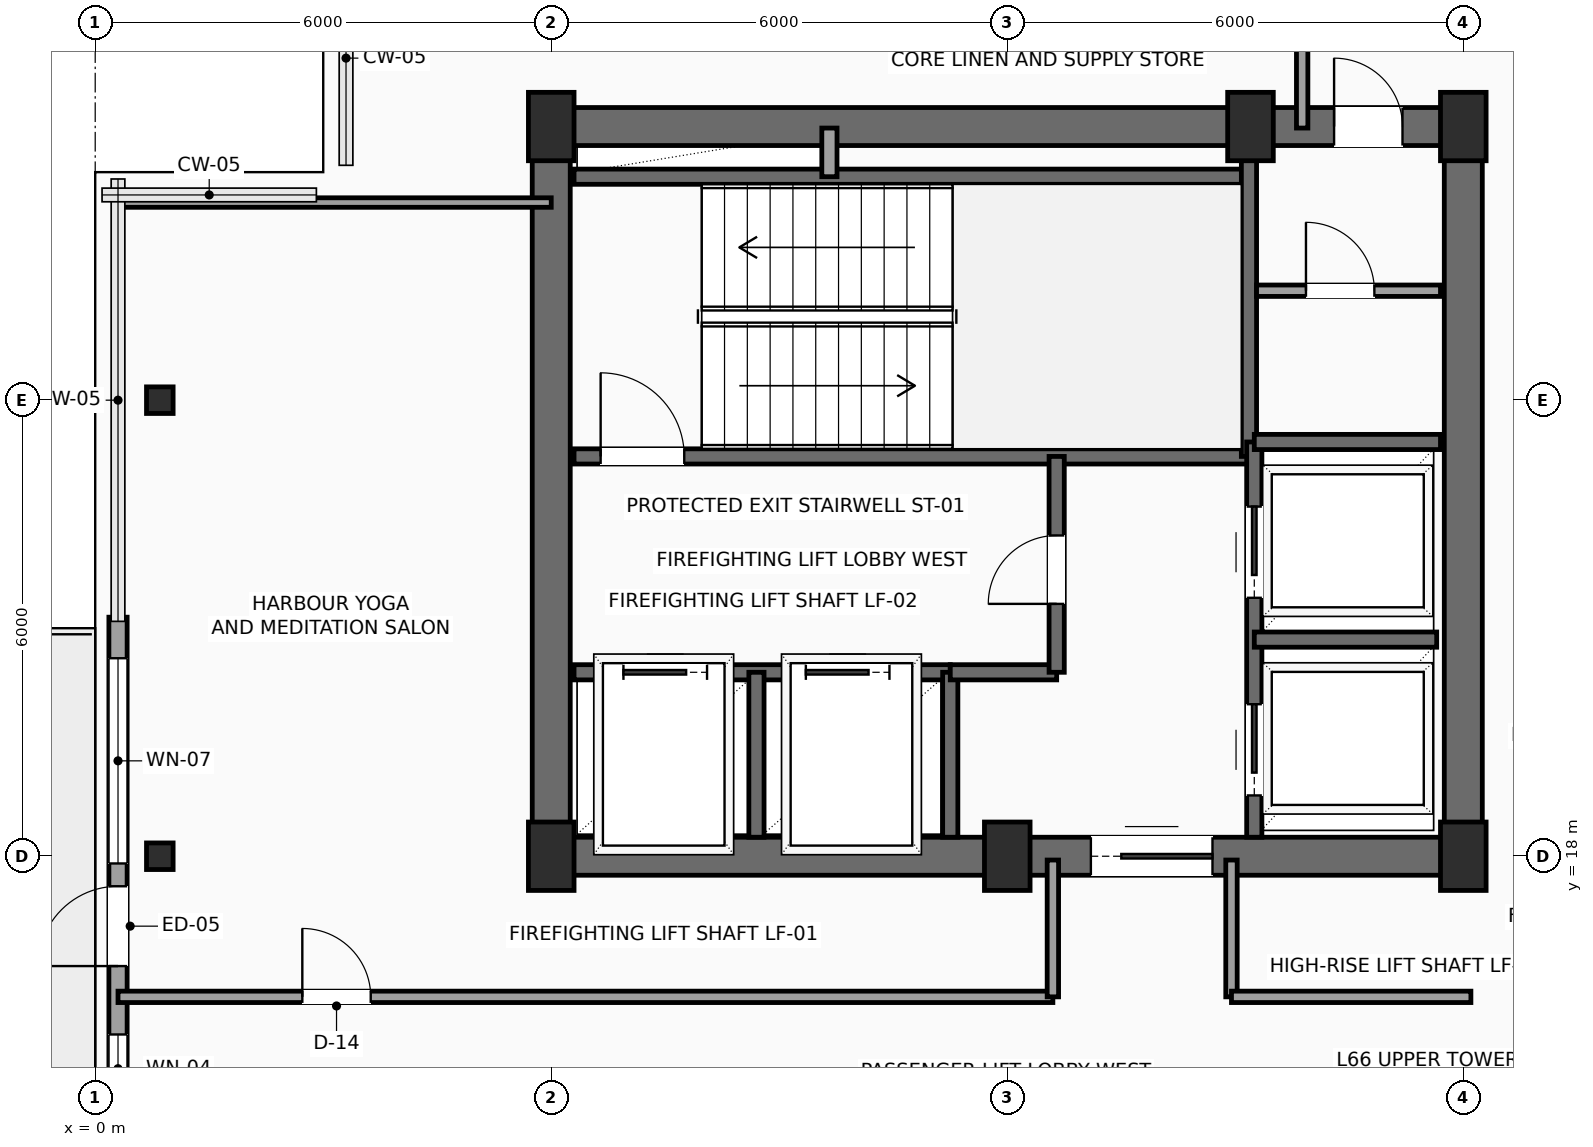
"""IFC4 building model, lengths in metres.
Left out: names, types, materials, properties, quantities, classifications, styles, units other than length and angle.
Written with IfcOpenShell. Run it as: python <this file> out.ifc"""

import sys

from ifc_helpers import new_model, si_unit, direction, frame, frame_2d, origin, origin_2d, place, context, subcontext, project, spatial, rectangle, hollow_rectangle, extrude, element, fill, save


model = new_model("IFC4")
c1 = context("Model", 3, precision=1e-05, world=origin(), true_north=direction((0.0, 1.0)))
c2 = subcontext(c1, "Body", "Model", "MODEL_VIEW")
j1 = project(units=[si_unit("LENGTHUNIT", "METRE"), si_unit("PLANEANGLEUNIT", "RADIAN")], contexts=[c1])
p1 = place(None, origin())
s1 = spatial("IfcSite", under=j1, at=p1, CompositionType="ELEMENT")
p2 = place(p1, origin())
s2 = spatial("IfcBuilding", under=s1, at=p2, CompositionType="ELEMENT")
p3 = place(p2, frame((0.0, 0.0, 264.2)))
s3 = spatial("IfcBuildingStorey", under=s2, at=p3, CompositionType="ELEMENT", Elevation=264.2)
for number, where, z_axis, x_axis in (
    (1, (6.0, 18.0, 0.0), (0.0, 0.0, 1.0), (1.0, 0.0, 0.0)),
    (2, (12.0, 18.0, 0.0), (0.0, 0.0, 1.0), (1.0, 0.0, 0.0)),
    (3, (18.0, 18.0, 0.0), (0.0, 0.0, 1.0), (1.0, 0.0, 0.0)),
    (4, (6.0, 27.6, 0.0), (0.0, 0.0, 1.0), (1.0, 0.0, 0.0)),
    (5, (15.2, 27.6, 0.0), (0.0, 0.0, 1.0), (1.0, 0.0, 0.0)),
    (6, (18.0, 27.6, 0.0), (0.0, 0.0, 1.0), (1.0, 0.0, 0.0)),
):
    element("IfcColumn", number, at=place(p3, frame(where, z_axis=z_axis, x_axis=x_axis)), inside=s3, PredefinedType="COLUMN", context=c2, shape_type="SweptSolid", body=[
        extrude(rectangle(XDim=0.6, YDim=0.9, at=origin_2d()), origin(), (0.0, 0.0, 1.0), 3.5),
    ])
for number, where, z_axis, x_axis in (
    (7, (0.85, 18.0, 0.0), (0.0, 0.0, 1.0), (1.0, 0.0, 0.0)),
    (8, (0.85, 24.0, 0.0), (0.0, 0.0, 1.0), (1.0, 0.0, 0.0)),
):
    element("IfcColumn", number, at=place(p3, frame(where, z_axis=z_axis, x_axis=x_axis)), inside=s3, PredefinedType="COLUMN", context=c2, shape_type="SweptSolid", body=[
        extrude(hollow_rectangle(XDim=0.35, YDim=0.35, WallThickness=0.016, InnerFilletRadius=0.016, OuterFilletRadius=0.032, at=origin_2d()), origin(), (0.0, 0.0, 1.0), 3.5),
    ])
p4 = place(p3, frame((0.3, 11.855, 0.0), z_axis=(0.0, 0.0, 1.0), x_axis=(0.0, 1.0, 0.0)))
e9 = element("IfcWall", 9, at=p4, inside=s3, PredefinedType="SOLIDWALL", context=c2, shape_type="SweptSolid", body=[
    extrude(rectangle(XDim=9.29, YDim=0.24, at=frame_2d((4.645, 0.0))), origin(), (0.0, 0.0, 1.0), 3.3),
])
p5 = place(p4, frame((4.7, 0.0, 0.0)))
e10 = element("IfcOpeningElement", 10, at=p5, cuts=e9, PredefinedType="OPENING", context=c2, shape_type="SweptSolid", body=[
    extrude(rectangle(XDim=1.05, YDim=2.2, at=frame_2d((0.525, 1.1))), frame((0.0, 0.13, 0.0), z_axis=(0.0, -1.0, 0.0), x_axis=(1.0, 0.0, 0.0)), (0.0, 0.0, 1.0), 0.26),
])
p6 = place(p4, frame((6.05, 0.0, 0.6)))
e11 = element("IfcOpeningElement", 11, at=p6, cuts=e9, PredefinedType="OPENING", context=c2, shape_type="SweptSolid", body=[
    extrude(rectangle(XDim=2.7, YDim=2.3, at=frame_2d((1.35, 1.15))), frame((0.0, 0.13, 0.0), z_axis=(0.0, -1.0, 0.0), x_axis=(1.0, 0.0, 0.0)), (0.0, 0.0, 1.0), 0.26),
])
p7 = place(p4, frame((2.9, 0.0, 0.6)))
e12 = element("IfcOpeningElement", 12, at=p7, cuts=e9, PredefinedType="OPENING", context=c2, shape_type="SweptSolid", body=[
    extrude(rectangle(XDim=0.9, YDim=2.2, at=frame_2d((0.45, 1.1))), frame((0.0, 0.13, 0.0), z_axis=(0.0, -1.0, 0.0), x_axis=(1.0, 0.0, 0.0)), (0.0, 0.0, 1.0), 0.26),
])
p8 = place(p3, frame((6.0, 18.0, 0.0), z_axis=(0.0, 0.0, 1.0), x_axis=(1.0, 0.0, 0.0)))
e13 = element("IfcWall", 13, at=p8, inside=s3, PredefinedType="SHEAR", context=c2, shape_type="SweptSolid", body=[
    extrude(rectangle(XDim=12.0, YDim=0.5, at=frame_2d((6.0, 0.0))), origin(), (0.0, 0.0, 1.0), 3.3),
])
p9 = place(p8, frame((7.1, 0.0, 0.0)))
e14 = element("IfcOpeningElement", 14, at=p9, cuts=e13, PredefinedType="OPENING", context=c2, shape_type="SweptSolid", body=[
    extrude(rectangle(XDim=1.6, YDim=2.3, at=frame_2d((0.8, 1.15))), frame((0.0, 0.26, 0.0), z_axis=(0.0, -1.0, 0.0), x_axis=(1.0, 0.0, 0.0)), (0.0, 0.0, 1.0), 0.52),
])
p10 = place(p3, frame((6.0, 27.6, 0.0), z_axis=(0.0, 0.0, 1.0), x_axis=(1.0, 0.0, 0.0)))
e15 = element("IfcWall", 15, at=p10, inside=s3, PredefinedType="SHEAR", context=c2, shape_type="SweptSolid", body=[
    extrude(rectangle(XDim=12.0, YDim=0.5, at=frame_2d((6.0, 0.0))), origin(), (0.0, 0.0, 1.0), 3.3),
])
p11 = place(p10, frame((10.3, 0.0, 0.0)))
e16 = element("IfcOpeningElement", 16, at=p11, cuts=e15, PredefinedType="OPENING", context=c2, shape_type="SweptSolid", body=[
    extrude(rectangle(XDim=0.9, YDim=2.15, at=frame_2d((0.45, 1.075))), frame((0.0, 0.26, 0.0), z_axis=(0.0, -1.0, 0.0), x_axis=(1.0, 0.0, 0.0)), (0.0, 0.0, 1.0), 0.52),
])
for number, where, z_axis, x_axis in (
    (17, (6.0, 18.0, 0.0), (0.0, 0.0, 1.0), (0.0, 1.0, 0.0)),
    (18, (18.0, 18.0, 0.0), (0.0, 0.0, 1.0), (0.0, 1.0, 0.0)),
):
    element("IfcWall", number, at=place(p3, frame(where, z_axis=z_axis, x_axis=x_axis)), inside=s3, PredefinedType="SHEAR", context=c2, shape_type="SweptSolid", body=[
        extrude(rectangle(XDim=9.6, YDim=0.5, at=frame_2d((4.8, 0.0))), origin(), (0.0, 0.0, 1.0), 3.3),
    ])
p12 = place(p3, frame((6.3, 23.26, 0.0), z_axis=(0.0, 0.0, 1.0), x_axis=(1.0, 0.0, 0.0)))
e19 = element("IfcWall", 19, at=p12, inside=s3, PredefinedType="SHEAR", context=c2, shape_type="SweptSolid", body=[
    extrude(rectangle(XDim=8.88, YDim=0.2, at=frame_2d((4.44, 0.0))), origin(), (0.0, 0.0, 1.0), 3.3),
])
p13 = place(p12, frame((0.35, 0.0, 0.0)))
e20 = element("IfcOpeningElement", 20, at=p13, cuts=e19, PredefinedType="OPENING", context=c2, shape_type="SweptSolid", body=[
    extrude(rectangle(XDim=1.1, YDim=2.2, at=frame_2d((0.55, 1.1))), frame((0.0, 0.11, 0.0), z_axis=(0.0, -1.0, 0.0), x_axis=(1.0, 0.0, 0.0)), (0.0, 0.0, 1.0), 0.22),
])
p14 = place(p3, frame((6.3, 26.94, 0.0), z_axis=(0.0, 0.0, 1.0), x_axis=(1.0, 0.0, 0.0)))
e21 = element("IfcWall", 21, at=p14, inside=s3, PredefinedType="SHEAR", context=c2, shape_type="SweptSolid", body=[
    extrude(rectangle(XDim=8.88, YDim=0.2, at=frame_2d((4.44, 0.0))), origin(), (0.0, 0.0, 1.0), 3.3),
])
p15 = place(p3, frame((15.18, 23.26, 0.0), z_axis=(0.0, 0.0, 1.0), x_axis=(0.0, 1.0, 0.0)))
e22 = element("IfcWall", 22, at=p15, inside=s3, PredefinedType="SHEAR", context=c2, shape_type="SweptSolid", body=[
    extrude(rectangle(XDim=4.04, YDim=0.2, at=frame_2d((2.02, 0.0))), origin(), (0.0, 0.0, 1.0), 3.3),
])
p16 = place(p3, frame((6.3, 20.42, 0.0), z_axis=(0.0, 0.0, 1.0), x_axis=(1.0, 0.0, 0.0)))
e23 = element("IfcWall", 23, at=p16, inside=s3, PredefinedType="SHEAR", context=c2, shape_type="SweptSolid", body=[
    extrude(rectangle(XDim=4.95, YDim=0.2, at=frame_2d((2.475, 0.0))), origin(), (0.0, 0.0, 1.0), 3.3),
])
p17 = place(p16, frame((0.65, 0.0, 0.0)))
e24 = element("IfcOpeningElement", 24, at=p17, cuts=e23, PredefinedType="OPENING", context=c2, shape_type="SweptSolid", body=[
    extrude(rectangle(XDim=1.1, YDim=2.2, at=frame_2d((0.55, 1.1))), frame((0.0, 0.11, 0.0), z_axis=(0.0, -1.0, 0.0), x_axis=(1.0, 0.0, 0.0)), (0.0, 0.0, 1.0), 0.22),
])
p18 = place(p16, frame((3.05, 0.0, 0.0)))
e25 = element("IfcOpeningElement", 25, at=p18, cuts=e23, PredefinedType="OPENING", context=c2, shape_type="SweptSolid", body=[
    extrude(rectangle(XDim=1.1, YDim=2.2, at=frame_2d((0.55, 1.1))), frame((0.0, 0.11, 0.0), z_axis=(0.0, -1.0, 0.0), x_axis=(1.0, 0.0, 0.0)), (0.0, 0.0, 1.0), 0.22),
])
for number, where, z_axis, x_axis in (
    (26, (8.7, 18.25, 0.0), (0.0, 0.0, 1.0), (0.0, 1.0, 0.0)),
    (27, (11.25, 18.25, 0.0), (0.0, 0.0, 1.0), (0.0, 1.0, 0.0)),
):
    element("IfcWall", number, at=place(p3, frame(where, z_axis=z_axis, x_axis=x_axis)), inside=s3, PredefinedType="SHEAR", context=c2, shape_type="SweptSolid", body=[
        extrude(rectangle(XDim=2.17, YDim=0.2, at=frame_2d((1.085, 0.0))), origin(), (0.0, 0.0, 1.0), 3.3),
    ])
p19 = place(p3, frame((11.25, 20.42, 0.0), z_axis=(0.0, 0.0, 1.0), x_axis=(1.0, 0.0, 0.0)))
e28 = element("IfcWall", 28, at=p19, inside=s3, PredefinedType="SHEAR", context=c2, shape_type="SweptSolid", body=[
    extrude(rectangle(XDim=1.4, YDim=0.2, at=frame_2d((0.7, 0.0))), origin(), (0.0, 0.0, 1.0), 3.3),
])
p20 = place(p3, frame((12.65, 20.42, 0.0), z_axis=(0.0, 0.0, 1.0), x_axis=(0.0, 1.0, 0.0)))
e29 = element("IfcWall", 29, at=p20, inside=s3, PredefinedType="SHEAR", context=c2, shape_type="SweptSolid", body=[
    extrude(rectangle(XDim=2.84, YDim=0.2, at=frame_2d((1.42, 0.0))), origin(), (0.0, 0.0, 1.0), 3.3),
])
p21 = place(p20, frame((0.9, 0.0, 0.0)))
e30 = element("IfcOpeningElement", 30, at=p21, cuts=e29, PredefinedType="OPENING", context=c2, shape_type="SweptSolid", body=[
    extrude(rectangle(XDim=0.9, YDim=2.15, at=frame_2d((0.45, 1.075))), frame((0.0, 0.11, 0.0), z_axis=(0.0, -1.0, 0.0), x_axis=(1.0, 0.0, 0.0)), (0.0, 0.0, 1.0), 0.22),
])
p22 = place(p3, frame((9.66, 26.94, 0.0), z_axis=(0.0, 0.0, 1.0), x_axis=(0.0, 1.0, 0.0)))
e31 = element("IfcWall", 31, at=p22, inside=s3, PredefinedType="SOLIDWALL", context=c2, shape_type="SweptSolid", body=[
    extrude(rectangle(XDim=0.64, YDim=0.2, at=frame_2d((0.32, 0.0))), origin(), (0.0, 0.0, 1.0), 3.3),
])
p23 = place(p3, frame((15.25, 18.25, 0.0), z_axis=(0.0, 0.0, 1.0), x_axis=(0.0, 1.0, 0.0)))
e32 = element("IfcWall", 32, at=p23, inside=s3, PredefinedType="SHEAR", context=c2, shape_type="SweptSolid", body=[
    extrude(rectangle(XDim=5.2, YDim=0.2, at=frame_2d((2.6, 0.0))), origin(), (0.0, 0.0, 1.0), 3.3),
])
p24 = place(p23, frame((0.55, 0.0, 0.0)))
e33 = element("IfcOpeningElement", 33, at=p24, cuts=e32, PredefinedType="OPENING", context=c2, shape_type="SweptSolid", body=[
    extrude(rectangle(XDim=1.2, YDim=2.2, at=frame_2d((0.6, 1.1))), frame((0.0, 0.11, 0.0), z_axis=(0.0, -1.0, 0.0), x_axis=(1.0, 0.0, 0.0)), (0.0, 0.0, 1.0), 0.22),
])
p25 = place(p23, frame((3.15, 0.0, 0.0)))
e34 = element("IfcOpeningElement", 34, at=p25, cuts=e32, PredefinedType="OPENING", context=c2, shape_type="SweptSolid", body=[
    extrude(rectangle(XDim=1.2, YDim=2.2, at=frame_2d((0.6, 1.1))), frame((0.0, 0.11, 0.0), z_axis=(0.0, -1.0, 0.0), x_axis=(1.0, 0.0, 0.0)), (0.0, 0.0, 1.0), 0.22),
])
p26 = place(p3, frame((15.25, 20.85, 0.0), z_axis=(0.0, 0.0, 1.0), x_axis=(1.0, 0.0, 0.0)))
e35 = element("IfcWall", 35, at=p26, inside=s3, PredefinedType="SHEAR", context=c2, shape_type="SweptSolid", body=[
    extrude(rectangle(XDim=2.4, YDim=0.2, at=frame_2d((1.2, 0.0))), origin(), (0.0, 0.0, 1.0), 3.3),
])
p27 = place(p3, frame((15.25, 23.45, 0.0), z_axis=(0.0, 0.0, 1.0), x_axis=(1.0, 0.0, 0.0)))
e36 = element("IfcWall", 36, at=p27, inside=s3, PredefinedType="SHEAR", context=c2, shape_type="SweptSolid", body=[
    extrude(rectangle(XDim=2.45, YDim=0.2, at=frame_2d((1.225, 0.0))), origin(), (0.0, 0.0, 1.0), 3.3),
])
p28 = place(p3, frame((15.28, 25.44, 0.0), z_axis=(0.0, 0.0, 1.0), x_axis=(1.0, 0.0, 0.0)))
e37 = element("IfcWall", 37, at=p28, inside=s3, PredefinedType="PARTITIONING", context=c2, shape_type="SweptSolid", body=[
    extrude(rectangle(XDim=2.42, YDim=0.15, at=frame_2d((1.21, 0.0))), origin(), (0.0, 0.0, 1.0), 3.3),
])
p29 = place(p28, frame((0.65, 0.0, 0.0)))
e38 = element("IfcOpeningElement", 38, at=p29, cuts=e37, PredefinedType="OPENING", context=c2, shape_type="SweptSolid", body=[
    extrude(rectangle(XDim=0.9, YDim=2.15, at=frame_2d((0.45, 1.075))), frame((0.0, 0.085, 0.0), z_axis=(0.0, -1.0, 0.0), x_axis=(1.0, 0.0, 0.0)), (0.0, 0.0, 1.0), 0.17),
])
p30 = place(p3, frame((0.3, 16.15, 0.0), z_axis=(0.0, 0.0, 1.0), x_axis=(1.0, 0.0, 0.0)))
e39 = element("IfcWall", 39, at=p30, inside=s3, PredefinedType="PARTITIONING", context=c2, shape_type="SweptSolid", body=[
    extrude(rectangle(XDim=12.3, YDim=0.15, at=frame_2d((6.15, 0.0))), origin(), (0.0, 0.0, 1.0), 3.3),
])
p31 = place(p30, frame((2.425, 0.0, 0.0)))
e40 = element("IfcOpeningElement", 40, at=p31, cuts=e39, PredefinedType="OPENING", context=c2, shape_type="SweptSolid", body=[
    extrude(rectangle(XDim=0.9, YDim=2.1, at=frame_2d((0.45, 1.05))), frame((0.0, 0.085, 0.0), z_axis=(0.0, -1.0, 0.0), x_axis=(1.0, 0.0, 0.0)), (0.0, 0.0, 1.0), 0.17),
])
for number, where, z_axis, x_axis in (
    (41, (12.6, 16.15, 0.0), (0.0, 0.0, 1.0), (0.0, 1.0, 0.0)),
    (42, (14.95, 17.95, 0.0), (0.0, 0.0, 1.0), (0.0, -1.0, 0.0)),
):
    element("IfcWall", number, at=place(p3, frame(where, z_axis=z_axis, x_axis=x_axis)), inside=s3, PredefinedType="PARTITIONING", context=c2, shape_type="SweptSolid", body=[
        extrude(rectangle(XDim=1.8, YDim=0.15, at=frame_2d((0.9, 0.0))), origin(), (0.0, 0.0, 1.0), 3.3),
    ])
p32 = place(p3, frame((14.95, 16.15, 0.0), z_axis=(0.0, 0.0, 1.0), x_axis=(1.0, 0.0, 0.0)))
e43 = element("IfcWall", 43, at=p32, inside=s3, PredefinedType="PARTITIONING", context=c2, shape_type="SweptSolid", body=[
    extrude(rectangle(XDim=3.15, YDim=0.15, at=frame_2d((1.575, 0.0))), origin(), (0.0, 0.0, 1.0), 3.3),
])
p33 = place(p3, frame((15.88, 27.58, 0.0), z_axis=(0.0, 0.0, 1.0), x_axis=(0.0, 1.0, 0.0)))
e44 = element("IfcWall", 44, at=p33, inside=s3, PredefinedType="PARTITIONING", context=c2, shape_type="SweptSolid", body=[
    extrude(rectangle(XDim=2.12, YDim=0.15, at=frame_2d((1.06, 0.0))), origin(), (0.0, 0.0, 1.0), 3.3),
])
p34 = place(p3, frame((0.3, 26.6, 0.0), z_axis=(0.0, 0.0, 1.0), x_axis=(1.0, 0.0, 0.0)))
e45 = element("IfcWall", 45, at=p34, inside=s3, PredefinedType="PARTITIONING", context=c2, shape_type="SweptSolid", body=[
    extrude(rectangle(XDim=5.7, YDim=0.125, at=frame_2d((2.85, 0.0))), origin(), (0.0, 0.0, 1.0), 3.3),
])
p35 = place(p5, origin())
e46 = element("IfcDoor", 46, at=p35, inside=s3, OperationType="SINGLE_SWING_LEFT", PredefinedType="DOOR", context=c2, shape_type="SweptSolid", body=[
    extrude(rectangle(XDim=1.05, YDim=2.2, at=frame_2d((0.525, 1.1))), frame((0.0, 0.025, 0.0), z_axis=(0.0, -1.0, 0.0), x_axis=(1.0, 0.0, 0.0)), (0.0, 0.0, 1.0), 0.05),
])
fill(e10, e46)
p36 = place(p6, origin())
e47 = element("IfcWindow", 47, at=p36, inside=s3, PartitioningType="SINGLE_PANEL", PredefinedType="WINDOW", context=c2, shape_type="SweptSolid", body=[
    extrude(rectangle(XDim=2.7, YDim=2.3, at=frame_2d((1.35, 1.15))), frame((0.0, 0.03, 0.0), z_axis=(0.0, -1.0, 0.0), x_axis=(1.0, 0.0, 0.0)), (0.0, 0.0, 1.0), 0.06),
])
fill(e11, e47)
p37 = place(p7, origin())
e48 = element("IfcWindow", 48, at=p37, inside=s3, PartitioningType="SINGLE_PANEL", PredefinedType="WINDOW", context=c2, shape_type="SweptSolid", body=[
    extrude(rectangle(XDim=0.9, YDim=2.2, at=frame_2d((0.45, 1.1))), frame((0.0, 0.03, 0.0), z_axis=(0.0, -1.0, 0.0), x_axis=(1.0, 0.0, 0.0)), (0.0, 0.0, 1.0), 0.06),
])
fill(e12, e48)
p38 = place(p9, origin())
e49 = element("IfcDoor", 49, at=p38, inside=s3, OperationType="DOUBLE_DOOR_SLIDING", PredefinedType="DOOR", context=c2, shape_type="SweptSolid", body=[
    extrude(rectangle(XDim=1.6, YDim=2.3, at=frame_2d((0.8, 1.15))), frame((0.0, 0.025, 0.0), z_axis=(0.0, -1.0, 0.0), x_axis=(1.0, 0.0, 0.0)), (0.0, 0.0, 1.0), 0.05),
])
fill(e14, e49)
p39 = place(p11, origin())
e50 = element("IfcDoor", 50, at=p39, inside=s3, OperationType="SINGLE_SWING_LEFT", PredefinedType="DOOR", context=c2, shape_type="SweptSolid", body=[
    extrude(rectangle(XDim=0.9, YDim=2.15, at=frame_2d((0.45, 1.075))), frame((0.0, 0.025, 0.0), z_axis=(0.0, -1.0, 0.0), x_axis=(1.0, 0.0, 0.0)), (0.0, 0.0, 1.0), 0.05),
])
fill(e16, e50)
p40 = place(p13, origin())
e51 = element("IfcDoor", 51, at=p40, inside=s3, OperationType="SINGLE_SWING_LEFT", PredefinedType="DOOR", context=c2, shape_type="SweptSolid", body=[
    extrude(rectangle(XDim=1.1, YDim=2.2, at=frame_2d((0.55, 1.1))), frame((0.0, 0.025, 0.0), z_axis=(0.0, -1.0, 0.0), x_axis=(1.0, 0.0, 0.0)), (0.0, 0.0, 1.0), 0.05),
])
fill(e20, e51)
p41 = place(p17, origin())
e52 = element("IfcDoor", 52, at=p41, inside=s3, OperationType="SLIDING_TO_LEFT", PredefinedType="DOOR", context=c2, shape_type="SweptSolid", body=[
    extrude(rectangle(XDim=1.1, YDim=2.2, at=frame_2d((0.55, 1.1))), frame((0.0, 0.025, 0.0), z_axis=(0.0, -1.0, 0.0), x_axis=(1.0, 0.0, 0.0)), (0.0, 0.0, 1.0), 0.05),
])
fill(e24, e52)
p42 = place(p18, origin())
e53 = element("IfcDoor", 53, at=p42, inside=s3, OperationType="SLIDING_TO_LEFT", PredefinedType="DOOR", context=c2, shape_type="SweptSolid", body=[
    extrude(rectangle(XDim=1.1, YDim=2.2, at=frame_2d((0.55, 1.1))), frame((0.0, 0.025, 0.0), z_axis=(0.0, -1.0, 0.0), x_axis=(1.0, 0.0, 0.0)), (0.0, 0.0, 1.0), 0.05),
])
fill(e25, e53)
p43 = place(p21, origin())
e54 = element("IfcDoor", 54, at=p43, inside=s3, OperationType="SINGLE_SWING_LEFT", PredefinedType="DOOR", context=c2, shape_type="SweptSolid", body=[
    extrude(rectangle(XDim=0.9, YDim=2.15, at=frame_2d((0.45, 1.075))), frame((0.0, 0.025, 0.0), z_axis=(0.0, -1.0, 0.0), x_axis=(1.0, 0.0, 0.0)), (0.0, 0.0, 1.0), 0.05),
])
fill(e30, e54)
p44 = place(p24, origin())
e55 = element("IfcDoor", 55, at=p44, inside=s3, OperationType="SLIDING_TO_RIGHT", PredefinedType="DOOR", context=c2, shape_type="SweptSolid", body=[
    extrude(rectangle(XDim=1.2, YDim=2.2, at=frame_2d((0.6, 1.1))), frame((0.0, 0.025, 0.0), z_axis=(0.0, -1.0, 0.0), x_axis=(1.0, 0.0, 0.0)), (0.0, 0.0, 1.0), 0.05),
])
fill(e33, e55)
p45 = place(p25, origin())
e56 = element("IfcDoor", 56, at=p45, inside=s3, OperationType="SLIDING_TO_RIGHT", PredefinedType="DOOR", context=c2, shape_type="SweptSolid", body=[
    extrude(rectangle(XDim=1.2, YDim=2.2, at=frame_2d((0.6, 1.1))), frame((0.0, 0.025, 0.0), z_axis=(0.0, -1.0, 0.0), x_axis=(1.0, 0.0, 0.0)), (0.0, 0.0, 1.0), 0.05),
])
fill(e34, e56)
p46 = place(p29, origin())
e57 = element("IfcDoor", 57, at=p46, inside=s3, OperationType="SINGLE_SWING_LEFT", PredefinedType="DOOR", context=c2, shape_type="SweptSolid", body=[
    extrude(rectangle(XDim=0.9, YDim=2.15, at=frame_2d((0.45, 1.075))), frame((0.0, 0.025, 0.0), z_axis=(0.0, -1.0, 0.0), x_axis=(1.0, 0.0, 0.0)), (0.0, 0.0, 1.0), 0.05),
])
fill(e38, e57)
p47 = place(p31, origin())
e58 = element("IfcDoor", 58, at=p47, inside=s3, OperationType="SINGLE_SWING_LEFT", PredefinedType="DOOR", context=c2, shape_type="SweptSolid", body=[
    extrude(rectangle(XDim=0.9, YDim=2.1, at=frame_2d((0.45, 1.05))), frame((0.0, 0.025, 0.0), z_axis=(0.0, -1.0, 0.0), x_axis=(1.0, 0.0, 0.0)), (0.0, 0.0, 1.0), 0.05),
])
fill(e40, e58)
save(model, sys.argv[1])
